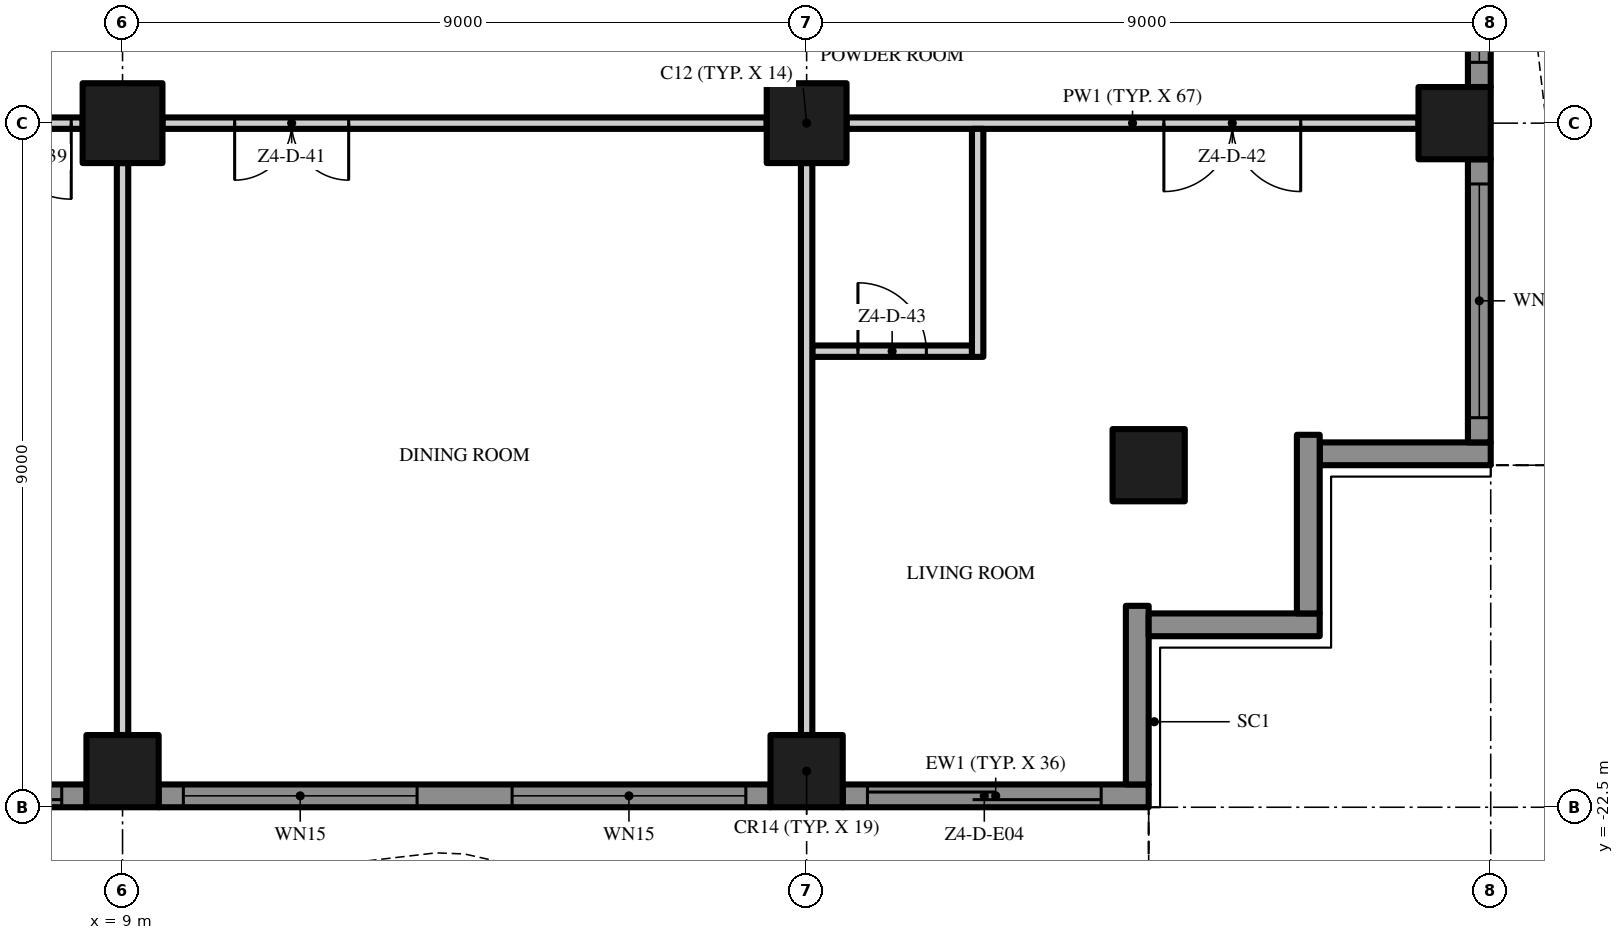
"""IFC4 building model, lengths in metres.
Left out: names, types, materials, properties, quantities, classifications, styles, units other than length and angle.
Written with IfcOpenShell. Run it as: python <this file> out.ifc"""

import sys

from ifc_helpers import new_model, si_unit, direction, frame, frame_2d, origin, origin_2d, place, context, subcontext, project, spatial, polyline, rectangle, outline, extrude, element, fill, save


model = new_model("IFC4")
c1 = context("Model", 3, precision=1e-05, world=origin(), true_north=direction((0.0, 1.0)))
c2 = subcontext(c1, "Body", "Model", "MODEL_VIEW")
j1 = project(units=[si_unit("LENGTHUNIT", "METRE"), si_unit("PLANEANGLEUNIT", "RADIAN")], contexts=[c1])
p1 = place(None, origin())
s1 = spatial("IfcSite", under=j1, at=p1, CompositionType="ELEMENT")
p2 = place(p1, origin())
s2 = spatial("IfcBuilding", under=s1, at=p2, CompositionType="ELEMENT")
p3 = place(p2, frame((0.0, 0.0, 222.4)))
s3 = spatial("IfcBuildingStorey", under=s2, at=p3, CompositionType="ELEMENT", Elevation=222.4)
p4 = place(p3, frame((18.0, -13.5, 0.0), z_axis=(0.0, 0.0, 1.0), x_axis=(1.0, 0.0, 0.0)))
e1 = element("IfcColumn", 1, at=p4, inside=s3, PredefinedType="COLUMN", context=c2, shape_type="SweptSolid", body=[
    extrude(rectangle(XDim=1.05, YDim=1.05, at=origin_2d()), origin(), (0.0, 0.0, 1.0), 3.5),
])
for number, where, z_axis, x_axis in (
    (2, (18.0, -22.025, 0.0), (0.0, 0.0, 1.0), (1.0, 0.0, 0.0)),
    (3, (26.525, -13.5, 0.0), (0.0, 0.0, 1.0), (1.0, 0.0, 0.0)),
    (4, (22.5, -18.0, 0.0), (0.0, 0.0, 1.0), (1.0, 0.0, 0.0)),
):
    element("IfcColumn", number, at=place(p3, frame(where, z_axis=z_axis, x_axis=x_axis)), inside=s3, PredefinedType="COLUMN", context=c2, shape_type="SweptSolid", body=[
        extrude(rectangle(XDim=0.95, YDim=0.95, at=origin_2d()), origin(), (0.0, 0.0, 1.0), 3.5),
    ])
p5 = place(p3, frame((9.0, -13.5, 0.0), z_axis=(0.0, 0.0, 1.0), x_axis=(1.0, 0.0, 0.0)))
e5 = element("IfcColumn", 5, at=p5, inside=s3, PredefinedType="COLUMN", context=c2, shape_type="SweptSolid", body=[
    extrude(rectangle(XDim=1.05, YDim=1.05, at=origin_2d()), origin(), (0.0, 0.0, 1.0), 3.5),
])
p6 = place(p3, frame((9.0, -22.025, 0.0), z_axis=(0.0, 0.0, 1.0), x_axis=(1.0, 0.0, 0.0)))
e6 = element("IfcColumn", 6, at=p6, inside=s3, PredefinedType="COLUMN", context=c2, shape_type="SweptSolid", body=[
    extrude(rectangle(XDim=0.95, YDim=0.95, at=origin_2d()), origin(), (0.0, 0.0, 1.0), 3.5),
])
p7 = place(p3, frame((8.525, -22.35, 0.0), z_axis=(0.0, 0.0, 1.0), x_axis=(-1.0, 0.0, 0.0)))
e7 = element("IfcWall", 7, at=p7, inside=s3, PredefinedType="SOLIDWALL", context=c2, shape_type="SweptSolid", body=[
    extrude(rectangle(XDim=8.05, YDim=0.3, at=frame_2d((4.025, 0.0))), origin(), (0.0, 0.0, 1.0), 3.5),
])
p8 = place(p7, frame((4.65, 0.0, 0.45)))
e8 = element("IfcOpeningElement", 8, at=p8, cuts=e7, PredefinedType="OPENING", context=c2, shape_type="SweptSolid", body=[
    extrude(rectangle(XDim=3.075, YDim=2.65, at=frame_2d((1.538, 1.325))), frame((0.0, 0.16, 0.0), z_axis=(0.0, -1.0, 0.0), x_axis=(1.0, 0.0, 0.0)), (0.0, 0.0, 1.0), 0.32),
])
p9 = place(p7, frame((0.325, 0.0, 0.0)))
e9 = element("IfcOpeningElement", 9, at=p9, cuts=e7, PredefinedType="OPENING", context=c2, shape_type="SweptSolid", body=[
    extrude(rectangle(XDim=3.075, YDim=2.4, at=frame_2d((1.538, 1.2))), frame((0.0, 0.16, 0.0), z_axis=(0.0, -1.0, 0.0), x_axis=(1.0, 0.0, 0.0)), (0.0, 0.0, 1.0), 0.32),
])
p10 = place(p3, frame((17.525, -22.35, 0.0), z_axis=(0.0, 0.0, 1.0), x_axis=(-1.0, 0.0, 0.0)))
e10 = element("IfcWall", 10, at=p10, inside=s3, PredefinedType="SOLIDWALL", context=c2, shape_type="SweptSolid", body=[
    extrude(rectangle(XDim=8.05, YDim=0.3, at=frame_2d((4.025, 0.0))), origin(), (0.0, 0.0, 1.0), 3.5),
])
p11 = place(p10, frame((4.65, 0.0, 0.45)))
e11 = element("IfcOpeningElement", 11, at=p11, cuts=e10, PredefinedType="OPENING", context=c2, shape_type="SweptSolid", body=[
    extrude(rectangle(XDim=3.075, YDim=2.65, at=frame_2d((1.538, 1.325))), frame((0.0, 0.16, 0.0), z_axis=(0.0, -1.0, 0.0), x_axis=(1.0, 0.0, 0.0)), (0.0, 0.0, 1.0), 0.32),
])
p12 = place(p10, frame((0.325, 0.0, 0.45)))
e12 = element("IfcOpeningElement", 12, at=p12, cuts=e10, PredefinedType="OPENING", context=c2, shape_type="SweptSolid", body=[
    extrude(rectangle(XDim=3.075, YDim=2.65, at=frame_2d((1.538, 1.325))), frame((0.0, 0.16, 0.0), z_axis=(0.0, -1.0, 0.0), x_axis=(1.0, 0.0, 0.0)), (0.0, 0.0, 1.0), 0.32),
])
p13 = place(p3, frame((22.5, -22.35, 0.0), z_axis=(0.0, 0.0, 1.0), x_axis=(-1.0, 0.0, 0.0)))
e13 = element("IfcWall", 13, at=p13, inside=s3, PredefinedType="SOLIDWALL", context=c2, shape_type="SweptSolid", body=[
    extrude(rectangle(XDim=4.025, YDim=0.3, at=frame_2d((2.013, 0.0))), origin(), (0.0, 0.0, 1.0), 3.5),
])
p14 = place(p13, frame((0.625, 0.0, 0.0)))
e14 = element("IfcOpeningElement", 14, at=p14, cuts=e13, PredefinedType="OPENING", context=c2, shape_type="SweptSolid", body=[
    extrude(rectangle(XDim=3.075, YDim=2.4, at=frame_2d((1.538, 1.2))), frame((0.0, 0.16, 0.0), z_axis=(0.0, -1.0, 0.0), x_axis=(1.0, 0.0, 0.0)), (0.0, 0.0, 1.0), 0.32),
])
p15 = place(p3, frame((22.35, -19.85, 0.0), z_axis=(0.0, 0.0, 1.0), x_axis=(0.0, -1.0, 0.0)))
e15 = element("IfcWall", 15, at=p15, inside=s3, PredefinedType="SOLIDWALL", context=c2, shape_type="SweptSolid", body=[
    extrude(rectangle(XDim=2.35, YDim=0.3, at=frame_2d((1.175, 0.0))), origin(), (0.0, 0.0, 1.0), 3.5),
])
p16 = place(p3, frame((24.75, -20.1, 0.0), z_axis=(0.0, 0.0, 1.0), x_axis=(-1.0, 0.0, 0.0)))
e16 = element("IfcWall", 16, at=p16, inside=s3, PredefinedType="SOLIDWALL", context=c2, shape_type="SweptSolid", body=[
    extrude(rectangle(XDim=2.25, YDim=0.3, at=frame_2d((1.125, 0.0))), origin(), (0.0, 0.0, 1.0), 3.5),
])
p17 = place(p3, frame((24.6, -17.6, 0.0), z_axis=(0.0, 0.0, 1.0), x_axis=(0.0, -1.0, 0.0)))
e17 = element("IfcWall", 17, at=p17, inside=s3, PredefinedType="SOLIDWALL", context=c2, shape_type="SweptSolid", body=[
    extrude(rectangle(XDim=2.35, YDim=0.3, at=frame_2d((1.175, 0.0))), origin(), (0.0, 0.0, 1.0), 3.5),
])
p18 = place(p3, frame((27.0, -17.85, 0.0), z_axis=(0.0, 0.0, 1.0), x_axis=(-1.0, 0.0, 0.0)))
e18 = element("IfcWall", 18, at=p18, inside=s3, PredefinedType="SOLIDWALL", context=c2, shape_type="SweptSolid", body=[
    extrude(rectangle(XDim=2.25, YDim=0.3, at=frame_2d((1.125, 0.0))), origin(), (0.0, 0.0, 1.0), 3.5),
])
p19 = place(p3, frame((26.85, -13.975, 0.0), z_axis=(0.0, 0.0, 1.0), x_axis=(0.0, -1.0, 0.0)))
e19 = element("IfcWall", 19, at=p19, inside=s3, PredefinedType="SOLIDWALL", context=c2, shape_type="SweptSolid", body=[
    extrude(rectangle(XDim=3.725, YDim=0.3, at=frame_2d((1.863, 0.0))), origin(), (0.0, 0.0, 1.0), 3.5),
])
p20 = place(p19, frame((0.325, 0.0, 0.45)))
e20 = element("IfcOpeningElement", 20, at=p20, cuts=e19, PredefinedType="OPENING", context=c2, shape_type="SweptSolid", body=[
    extrude(rectangle(XDim=3.075, YDim=2.65, at=frame_2d((1.538, 1.325))), frame((0.0, 0.16, 0.0), z_axis=(0.0, -1.0, 0.0), x_axis=(1.0, 0.0, 0.0)), (0.0, 0.0, 1.0), 0.32),
])
p21 = place(p3, frame((26.85, -4.975, 0.0), z_axis=(0.0, 0.0, 1.0), x_axis=(0.0, -1.0, 0.0)))
e21 = element("IfcWall", 21, at=p21, inside=s3, PredefinedType="SOLIDWALL", context=c2, shape_type="SweptSolid", body=[
    extrude(rectangle(XDim=8.05, YDim=0.3, at=frame_2d((4.025, 0.0))), origin(), (0.0, 0.0, 1.0), 3.5),
])
p22 = place(p21, frame((4.65, 0.0, 0.45)))
e22 = element("IfcOpeningElement", 22, at=p22, cuts=e21, PredefinedType="OPENING", context=c2, shape_type="SweptSolid", body=[
    extrude(rectangle(XDim=3.075, YDim=2.65, at=frame_2d((1.538, 1.325))), frame((0.0, 0.16, 0.0), z_axis=(0.0, -1.0, 0.0), x_axis=(1.0, 0.0, 0.0)), (0.0, 0.0, 1.0), 0.32),
])
p23 = place(p21, frame((0.325, 0.0, 0.0)))
e23 = element("IfcOpeningElement", 23, at=p23, cuts=e21, PredefinedType="OPENING", context=c2, shape_type="SweptSolid", body=[
    extrude(rectangle(XDim=3.075, YDim=2.4, at=frame_2d((1.538, 1.2))), frame((0.0, 0.16, 0.0), z_axis=(0.0, -1.0, 0.0), x_axis=(1.0, 0.0, 0.0)), (0.0, 0.0, 1.0), 0.32),
])
p24 = place(p3, origin())
e24 = element("IfcWall", 24, at=p24, inside=s3, PredefinedType="USERDEFINED", context=c2, shape_type="SweptSolid", body=[
    extrude(outline(polyline([(-22.5, -25.149), (-21.0, -24.488), (-19.5, -23.755), (-18.0, -23.231), (-16.875, -23.1), (-16.5, -23.115), (-15.0, -23.451), (-13.5, -24.112), (-12.0, -24.845), (-10.5, -25.369), (-9.375, -25.5), (-9.0, -25.485), (-7.5, -25.149), (-6.0, -24.488), (-4.5, -23.755), (-3.0, -23.231), (-1.875, -23.1), (-1.5, -23.115), (0.0, -23.451), (1.5, -24.112), (3.0, -24.845), (4.5, -25.369), (5.625, -25.5), (6.0, -25.485), (7.5, -25.149), (9.0, -24.488), (10.5, -23.755), (12.0, -23.231), (13.125, -23.1), (13.5, -23.115), (15.0, -23.451), (16.5, -24.112), (18.0, -24.845), (19.5, -25.369), (20.625, -25.5), (21.0, -25.485), (22.5, -25.149), (22.445, -24.905), (20.967, -25.236), (20.635, -25.249), (19.556, -25.124), (18.096, -24.614), (16.605, -23.885), (15.079, -23.213), (13.533, -22.866), (13.115, -22.849), (11.944, -22.986), (10.404, -23.524), (8.895, -24.261), (7.421, -24.91), (5.967, -25.236), (5.635, -25.249), (4.556, -25.124), (3.096, -24.614), (1.605, -23.885), (0.079, -23.213), (-1.467, -22.866), (-1.885, -22.849), (-3.056, -22.986), (-4.596, -23.524), (-6.105, -24.261), (-7.579, -24.91), (-9.033, -25.236), (-9.365, -25.249), (-10.444, -25.124), (-11.904, -24.614), (-13.395, -23.885), (-14.921, -23.213), (-16.467, -22.866), (-16.885, -22.849), (-18.056, -22.986), (-19.596, -23.524), (-21.105, -24.261), (-22.601, -24.92), (-22.5, -25.149)])), origin(), (0.0, 0.0, 1.0), 0.9),
])
p25 = place(p3, origin())
e25 = element("IfcWall", 25, at=p25, inside=s3, PredefinedType="USERDEFINED", context=c2, shape_type="SweptSolid", body=[
    extrude(outline(polyline([(29.649, -18.0), (28.988, -16.5), (28.255, -15.0), (27.731, -13.5), (27.6, -12.375), (27.615, -12.0), (27.951, -10.5), (28.612, -9.0), (29.345, -7.5), (29.869, -6.0), (30.0, -4.875), (29.985, -4.5), (29.649, -3.0), (28.988, -1.5), (28.255, 0.0), (27.731, 1.5), (27.6, 2.625), (27.615, 3.0), (27.951, 4.5), (28.612, 6.0), (29.345, 7.5), (29.869, 9.0), (30.0, 10.125), (29.985, 10.5), (29.649, 12.0), (28.988, 13.5), (28.255, 15.0), (27.731, 16.5), (27.6, 17.625), (27.615, 18.0), (27.365, 18.01), (27.349, 17.615), (27.486, 16.444), (28.024, 14.904), (28.761, 13.395), (29.41, 11.921), (29.736, 10.467), (29.749, 10.135), (29.624, 9.056), (29.114, 7.596), (28.385, 6.105), (27.713, 4.579), (27.366, 3.033), (27.349, 2.615), (27.486, 1.444), (28.024, -0.096), (28.761, -1.605), (29.41, -3.079), (29.736, -4.533), (29.749, -4.865), (29.624, -5.944), (29.114, -7.404), (28.385, -8.895), (27.713, -10.421), (27.366, -11.967), (27.349, -12.385), (27.486, -13.556), (28.024, -15.096), (28.761, -16.605), (29.42, -18.101), (29.649, -18.0)])), origin(), (0.0, 0.0, 1.0), 0.9),
])
p26 = place(p3, frame((18.075, -16.5, 0.0), z_axis=(0.0, 0.0, 1.0), x_axis=(1.0, 0.0, 0.0)))
e26 = element("IfcWall", 26, at=p26, inside=s3, PredefinedType="PARTITIONING", context=c2, shape_type="SweptSolid", body=[
    extrude(rectangle(XDim=2.1, YDim=0.15, at=frame_2d((1.05, 0.0))), origin(), (0.0, 0.0, 1.0), 3.5),
])
p27 = place(p26, frame((0.6, 0.0, 0.0)))
e27 = element("IfcOpeningElement", 27, at=p27, cuts=e26, PredefinedType="OPENING", context=c2, shape_type="SweptSolid", body=[
    extrude(rectangle(XDim=0.9, YDim=2.1, at=frame_2d((0.45, 1.05))), frame((0.0, 0.085, 0.0), z_axis=(0.0, -1.0, 0.0), x_axis=(1.0, 0.0, 0.0)), (0.0, 0.0, 1.0), 0.17),
])
p28 = place(p3, frame((8.475, -13.5, 0.0), z_axis=(0.0, 0.0, 1.0), x_axis=(-1.0, 0.0, 0.0)))
e28 = element("IfcWall", 28, at=p28, inside=s3, PredefinedType="PARTITIONING", context=c2, shape_type="SweptSolid", body=[
    extrude(rectangle(XDim=7.95, YDim=0.15, at=frame_2d((3.975, 0.0))), origin(), (0.0, 0.0, 1.0), 3.5),
])
p29 = place(p28, frame((6.8, 0.0, 0.0)))
e29 = element("IfcOpeningElement", 29, at=p29, cuts=e28, PredefinedType="OPENING", context=c2, shape_type="SweptSolid", body=[
    extrude(rectangle(XDim=1.0, YDim=2.4, at=frame_2d((0.5, 1.2))), frame((0.0, 0.085, 0.0), z_axis=(0.0, -1.0, 0.0), x_axis=(1.0, 0.0, 0.0)), (0.0, 0.0, 1.0), 0.17),
])
p30 = place(p28, frame((0.15, 0.0, 0.0)))
e30 = element("IfcOpeningElement", 30, at=p30, cuts=e28, PredefinedType="OPENING", context=c2, shape_type="SweptSolid", body=[
    extrude(rectangle(XDim=1.0, YDim=2.4, at=frame_2d((0.5, 1.2))), frame((0.0, 0.085, 0.0), z_axis=(0.0, -1.0, 0.0), x_axis=(1.0, 0.0, 0.0)), (0.0, 0.0, 1.0), 0.17),
])
p31 = place(p3, frame((17.475, -13.5, 0.0), z_axis=(0.0, 0.0, 1.0), x_axis=(-1.0, 0.0, 0.0)))
e31 = element("IfcWall", 31, at=p31, inside=s3, PredefinedType="PARTITIONING", context=c2, shape_type="SweptSolid", body=[
    extrude(rectangle(XDim=7.95, YDim=0.15, at=frame_2d((3.975, 0.0))), origin(), (0.0, 0.0, 1.0), 3.5),
])
p32 = place(p31, frame((5.5, 0.0, 0.0)))
e32 = element("IfcOpeningElement", 32, at=p32, cuts=e31, PredefinedType="OPENING", context=c2, shape_type="SweptSolid", body=[
    extrude(rectangle(XDim=1.5, YDim=2.4, at=frame_2d((0.75, 1.2))), frame((0.0, 0.085, 0.0), z_axis=(0.0, -1.0, 0.0), x_axis=(1.0, 0.0, 0.0)), (0.0, 0.0, 1.0), 0.17),
])
p33 = place(p3, frame((26.05, -13.5, 0.0), z_axis=(0.0, 0.0, 1.0), x_axis=(-1.0, 0.0, 0.0)))
e33 = element("IfcWall", 33, at=p33, inside=s3, PredefinedType="PARTITIONING", context=c2, shape_type="SweptSolid", body=[
    extrude(rectangle(XDim=7.525, YDim=0.15, at=frame_2d((3.763, 0.0))), origin(), (0.0, 0.0, 1.0), 3.5),
])
p34 = place(p33, frame((1.55, 0.0, 0.0)))
e34 = element("IfcOpeningElement", 34, at=p34, cuts=e33, PredefinedType="OPENING", context=c2, shape_type="SweptSolid", body=[
    extrude(rectangle(XDim=1.8, YDim=2.4, at=frame_2d((0.9, 1.2))), frame((0.0, 0.085, 0.0), z_axis=(0.0, -1.0, 0.0), x_axis=(1.0, 0.0, 0.0)), (0.0, 0.0, 1.0), 0.17),
])
for number, where, z_axis, x_axis in (
    (35, (9.0, -21.55, 0.0), (0.0, 0.0, 1.0), (0.0, 1.0, 0.0)),
    (36, (18.0, -21.55, 0.0), (0.0, 0.0, 1.0), (0.0, 1.0, 0.0)),
):
    element("IfcWall", number, at=place(p3, frame(where, z_axis=z_axis, x_axis=x_axis)), inside=s3, PredefinedType="PARTITIONING", context=c2, shape_type="SweptSolid", body=[
        extrude(rectangle(XDim=7.525, YDim=0.15, at=frame_2d((3.763, 0.0))), origin(), (0.0, 0.0, 1.0), 3.5),
    ])
p35 = place(p3, frame((20.25, -16.575, 0.0), z_axis=(0.0, 0.0, 1.0), x_axis=(0.0, 1.0, 0.0)))
e37 = element("IfcWall", 37, at=p35, inside=s3, PredefinedType="PARTITIONING", context=c2, shape_type="SweptSolid", body=[
    extrude(rectangle(XDim=3.0, YDim=0.15, at=frame_2d((1.5, 0.0))), origin(), (0.0, 0.0, 1.0), 3.5),
])
p36 = place(p9, origin())
e38 = element("IfcDoor", 38, at=p36, inside=s3, OperationType="SINGLE_SWING_LEFT", PredefinedType="DOOR", context=c2, shape_type="SweptSolid", body=[
    extrude(rectangle(XDim=3.075, YDim=2.4, at=frame_2d((1.538, 1.2))), frame((0.0, 0.025, 0.0), z_axis=(0.0, -1.0, 0.0), x_axis=(1.0, 0.0, 0.0)), (0.0, 0.0, 1.0), 0.05),
])
fill(e9, e38)
p37 = place(p11, origin())
e39 = element("IfcWindow", 39, at=p37, inside=s3, PartitioningType="SINGLE_PANEL", PredefinedType="WINDOW", context=c2, shape_type="SweptSolid", body=[
    extrude(rectangle(XDim=3.075, YDim=2.65, at=frame_2d((1.538, 1.325))), frame((0.0, 0.03, 0.0), z_axis=(0.0, -1.0, 0.0), x_axis=(1.0, 0.0, 0.0)), (0.0, 0.0, 1.0), 0.06),
])
fill(e11, e39)
p38 = place(p12, origin())
e40 = element("IfcWindow", 40, at=p38, inside=s3, PartitioningType="SINGLE_PANEL", PredefinedType="WINDOW", context=c2, shape_type="SweptSolid", body=[
    extrude(rectangle(XDim=3.075, YDim=2.65, at=frame_2d((1.538, 1.325))), frame((0.0, 0.03, 0.0), z_axis=(0.0, -1.0, 0.0), x_axis=(1.0, 0.0, 0.0)), (0.0, 0.0, 1.0), 0.06),
])
fill(e12, e40)
p39 = place(p14, origin())
e41 = element("IfcDoor", 41, at=p39, inside=s3, OperationType="SINGLE_SWING_LEFT", PredefinedType="DOOR", context=c2, shape_type="SweptSolid", body=[
    extrude(rectangle(XDim=3.075, YDim=2.4, at=frame_2d((1.538, 1.2))), frame((0.0, 0.025, 0.0), z_axis=(0.0, -1.0, 0.0), x_axis=(1.0, 0.0, 0.0)), (0.0, 0.0, 1.0), 0.05),
])
fill(e14, e41)
p40 = place(p20, origin())
e42 = element("IfcWindow", 42, at=p40, inside=s3, PartitioningType="SINGLE_PANEL", PredefinedType="WINDOW", context=c2, shape_type="SweptSolid", body=[
    extrude(rectangle(XDim=3.075, YDim=2.65, at=frame_2d((1.538, 1.325))), frame((0.0, 0.03, 0.0), z_axis=(0.0, -1.0, 0.0), x_axis=(1.0, 0.0, 0.0)), (0.0, 0.0, 1.0), 0.06),
])
fill(e20, e42)
p41 = place(p22, origin())
e43 = element("IfcWindow", 43, at=p41, inside=s3, PartitioningType="SINGLE_PANEL", PredefinedType="WINDOW", context=c2, shape_type="SweptSolid", body=[
    extrude(rectangle(XDim=3.075, YDim=2.65, at=frame_2d((1.538, 1.325))), frame((0.0, 0.03, 0.0), z_axis=(0.0, -1.0, 0.0), x_axis=(1.0, 0.0, 0.0)), (0.0, 0.0, 1.0), 0.06),
])
fill(e22, e43)
p42 = place(p30, origin())
e44 = element("IfcDoor", 44, at=p42, inside=s3, OperationType="SINGLE_SWING_LEFT", PredefinedType="DOOR", context=c2, shape_type="SweptSolid", body=[
    extrude(rectangle(XDim=1.0, YDim=2.4, at=frame_2d((0.5, 1.2))), frame((0.0, 0.025, 0.0), z_axis=(0.0, -1.0, 0.0), x_axis=(1.0, 0.0, 0.0)), (0.0, 0.0, 1.0), 0.05),
])
fill(e30, e44)
p43 = place(p32, origin())
e45 = element("IfcDoor", 45, at=p43, inside=s3, OperationType="DOUBLE_DOOR_SINGLE_SWING", PredefinedType="DOOR", context=c2, shape_type="SweptSolid", body=[
    extrude(rectangle(XDim=1.5, YDim=2.4, at=frame_2d((0.75, 1.2))), frame((0.0, 0.025, 0.0), z_axis=(0.0, -1.0, 0.0), x_axis=(1.0, 0.0, 0.0)), (0.0, 0.0, 1.0), 0.05),
])
fill(e32, e45)
p44 = place(p34, origin())
e46 = element("IfcDoor", 46, at=p44, inside=s3, OperationType="DOUBLE_DOOR_SINGLE_SWING", PredefinedType="DOOR", context=c2, shape_type="SweptSolid", body=[
    extrude(rectangle(XDim=1.8, YDim=2.4, at=frame_2d((0.9, 1.2))), frame((0.0, 0.025, 0.0), z_axis=(0.0, -1.0, 0.0), x_axis=(1.0, 0.0, 0.0)), (0.0, 0.0, 1.0), 0.05),
])
fill(e34, e46)
p45 = place(p27, origin())
e47 = element("IfcDoor", 47, at=p45, inside=s3, OperationType="SINGLE_SWING_LEFT", PredefinedType="DOOR", context=c2, shape_type="SweptSolid", body=[
    extrude(rectangle(XDim=0.9, YDim=2.1, at=frame_2d((0.45, 1.05))), frame((0.0, 0.025, 0.0), z_axis=(0.0, -1.0, 0.0), x_axis=(1.0, 0.0, 0.0)), (0.0, 0.0, 1.0), 0.05),
])
fill(e27, e47)
save(model, sys.argv[1])
